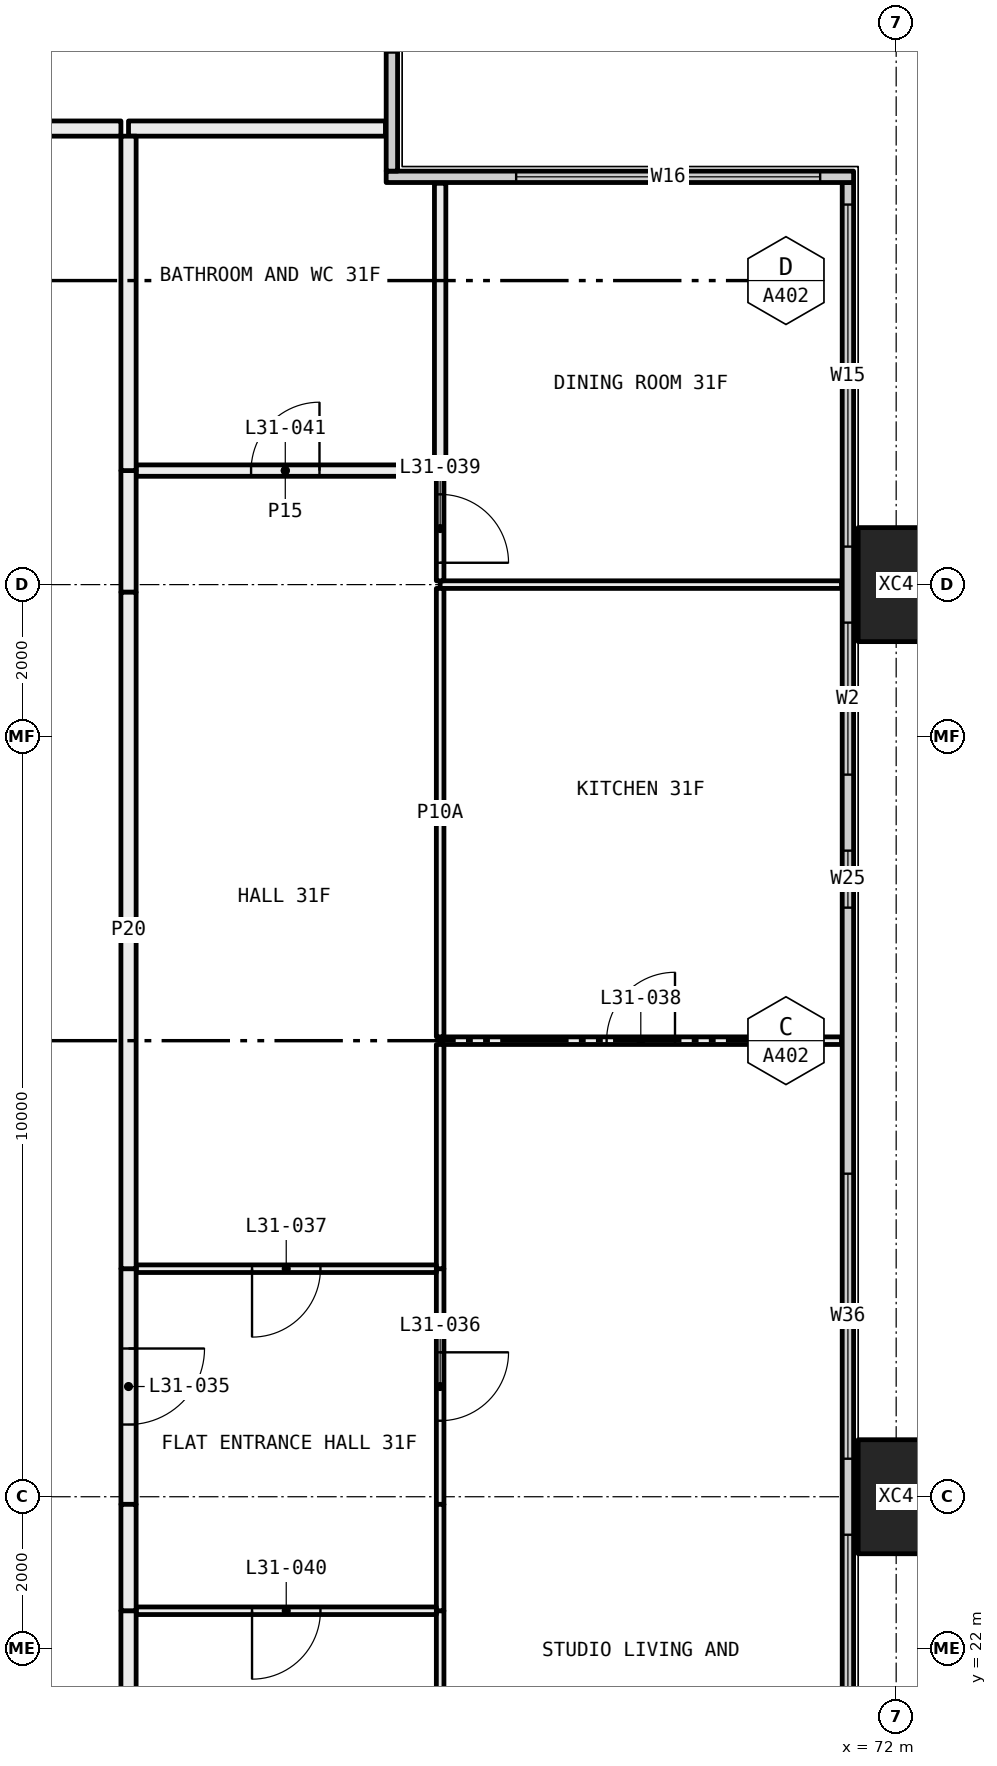
"""IFC4 building model, lengths in metres.
Left out: names, types, materials, properties, quantities, classifications, styles, units other than length and angle.
Written with IfcOpenShell. Run it as: python <this file> out.ifc"""

import sys

from ifc_helpers import new_model, si_unit, direction, frame, frame_2d, origin, origin_2d, place, context, subcontext, project, spatial, rectangle, hollow_rectangle, extrude, element, fill, save


model = new_model("IFC4")
c1 = context("Model", 3, precision=1e-05, world=origin(), true_north=direction((0.0, 1.0)))
c2 = subcontext(c1, "Body", "Model", "MODEL_VIEW")
j1 = project(units=[si_unit("LENGTHUNIT", "METRE"), si_unit("PLANEANGLEUNIT", "RADIAN")], contexts=[c1])
p1 = place(None, origin())
s1 = spatial("IfcSite", under=j1, at=p1, CompositionType="ELEMENT")
p2 = place(p1, origin())
s2 = spatial("IfcBuilding", under=s1, at=p2, CompositionType="ELEMENT")
p3 = place(p2, frame((0.0, 0.0, 120.75)))
s3 = spatial("IfcBuildingStorey", under=s2, at=p3, CompositionType="ELEMENT", Elevation=120.75)
for number, where, z_axis, x_axis in (
    (1, (72.0, 24.0, -0.4), (0.0, 0.0, 1.0), (0.0, 1.0, 0.0)),
    (2, (72.0, 36.0, -0.4), (0.0, 0.0, 1.0), (0.0, 1.0, 0.0)),
):
    element("IfcColumn", number, at=place(p3, frame(where, z_axis=z_axis, x_axis=x_axis)), inside=s3, PredefinedType="COLUMN", context=c2, shape_type="SweptSolid", body=[
        extrude(hollow_rectangle(XDim=1.5, YDim=1.0, WallThickness=0.06, at=origin_2d()), origin(), (0.0, 0.0, 1.0), 3.45),
    ])
p4 = place(p3, frame((71.365, 18.71, 0.0), z_axis=(0.0, 0.0, 1.0), x_axis=(0.0, 1.0, 0.0)))
e3 = element("IfcWall", 3, at=p4, inside=s3, PredefinedType="ELEMENTEDWALL", context=c2, shape_type="SweptSolid", body=[
    extrude(rectangle(XDim=22.58, YDim=0.15, at=frame_2d((11.29, 0.0))), origin(), (0.0, 0.0, 1.0), 3.05),
])
p5 = place(p4, frame((0.29, 0.0, 0.45)))
e4 = element("IfcOpeningElement", 4, at=p5, cuts=e3, PredefinedType="OPENING", context=c2, shape_type="SweptSolid", body=[
    extrude(rectangle(XDim=4.5, YDim=2.55, at=frame_2d((2.25, 1.275))), frame((0.0, 0.085, 0.0), z_axis=(0.0, -1.0, 0.0), x_axis=(1.0, 0.0, 0.0)), (0.0, 0.0, 1.0), 0.17),
])
p6 = place(p4, frame((5.79, 0.0, 0.45)))
e5 = element("IfcOpeningElement", 5, at=p6, cuts=e3, PredefinedType="OPENING", context=c2, shape_type="SweptSolid", body=[
    extrude(rectangle(XDim=3.75, YDim=2.55, at=frame_2d((1.875, 1.275))), frame((0.0, 0.085, 0.0), z_axis=(0.0, -1.0, 0.0), x_axis=(1.0, 0.0, 0.0)), (0.0, 0.0, 1.0), 0.17),
])
p7 = place(p4, frame((13.04, 0.0, 0.45)))
e6 = element("IfcOpeningElement", 6, at=p7, cuts=e3, PredefinedType="OPENING", context=c2, shape_type="SweptSolid", body=[
    extrude(rectangle(XDim=0.75, YDim=2.55, at=frame_2d((0.375, 1.275))), frame((0.0, 0.085, 0.0), z_axis=(0.0, -1.0, 0.0), x_axis=(1.0, 0.0, 0.0)), (0.0, 0.0, 1.0), 0.17),
])
p8 = place(p4, frame((14.79, 0.0, 0.45)))
e7 = element("IfcOpeningElement", 7, at=p8, cuts=e3, PredefinedType="OPENING", context=c2, shape_type="SweptSolid", body=[
    extrude(rectangle(XDim=2.0, YDim=2.55, at=frame_2d((1.0, 1.275))), frame((0.0, 0.085, 0.0), z_axis=(0.0, -1.0, 0.0), x_axis=(1.0, 0.0, 0.0)), (0.0, 0.0, 1.0), 0.17),
])
p9 = place(p4, frame((17.79, 0.0, 0.45)))
e8 = element("IfcOpeningElement", 8, at=p9, cuts=e3, PredefinedType="OPENING", context=c2, shape_type="SweptSolid", body=[
    extrude(rectangle(XDim=4.5, YDim=2.55, at=frame_2d((2.25, 1.275))), frame((0.0, 0.085, 0.0), z_axis=(0.0, -1.0, 0.0), x_axis=(1.0, 0.0, 0.0)), (0.0, 0.0, 1.0), 0.17),
])
p10 = place(p3, frame((65.29, 41.365, 0.0), z_axis=(0.0, 0.0, 1.0), x_axis=(1.0, 0.0, 0.0)))
e9 = element("IfcWall", 9, at=p10, inside=s3, PredefinedType="ELEMENTEDWALL", context=c2, shape_type="SweptSolid", body=[
    extrude(rectangle(XDim=6.15, YDim=0.15, at=frame_2d((3.075, 0.0))), origin(), (0.0, 0.0, 1.0), 3.05),
])
p11 = place(p10, frame((1.71, 0.0, 0.45)))
e10 = element("IfcOpeningElement", 10, at=p11, cuts=e9, PredefinedType="OPENING", context=c2, shape_type="SweptSolid", body=[
    extrude(rectangle(XDim=4.0, YDim=2.55, at=frame_2d((2.0, 1.275))), frame((0.0, 0.085, 0.0), z_axis=(0.0, -1.0, 0.0), x_axis=(1.0, 0.0, 0.0)), (0.0, 0.0, 1.0), 0.17),
])
p12 = place(p3, frame((65.365, 41.44, 0.0), z_axis=(0.0, 0.0, 1.0), x_axis=(0.0, 1.0, 0.0)))
e11 = element("IfcWall", 11, at=p12, inside=s3, PredefinedType="ELEMENTEDWALL", context=c2, shape_type="SweptSolid", body=[
    extrude(rectangle(XDim=5.85, YDim=0.15, at=frame_2d((2.925, 0.0))), origin(), (0.0, 0.0, 1.0), 3.05),
])
p13 = place(p12, frame((1.56, 0.0, 0.45)))
e12 = element("IfcOpeningElement", 12, at=p13, cuts=e11, PredefinedType="OPENING", context=c2, shape_type="SweptSolid", body=[
    extrude(rectangle(XDim=4.0, YDim=2.55, at=frame_2d((2.0, 1.275))), frame((0.0, 0.085, 0.0), z_axis=(0.0, -1.0, 0.0), x_axis=(1.0, 0.0, 0.0)), (0.0, 0.0, 1.0), 0.17),
])
p14 = place(p3, frame((71.28, 30.0, 0.0), z_axis=(0.0, 0.0, 1.0), x_axis=(-1.0, 0.0, 0.0)))
e13 = element("IfcWall", 13, at=p14, inside=s3, PredefinedType="PARTITIONING", context=c2, shape_type="SweptSolid", body=[
    extrude(rectangle(XDim=5.28, YDim=0.1, at=frame_2d((2.64, 0.0))), origin(), (0.0, 0.0, 1.0), 3.05),
])
p15 = place(p14, frame((2.19, 0.0, 0.0)))
e14 = element("IfcOpeningElement", 14, at=p15, cuts=e13, PredefinedType="OPENING", context=c2, shape_type="SweptSolid", body=[
    extrude(rectangle(XDim=0.9, YDim=2.1, at=frame_2d((0.45, 1.05))), frame((0.0, 0.06, 0.0), z_axis=(0.0, -1.0, 0.0), x_axis=(1.0, 0.0, 0.0)), (0.0, 0.0, 1.0), 0.12),
])
p16 = place(p3, frame((66.0, 22.5, 0.0), z_axis=(0.0, 0.0, 1.0), x_axis=(0.0, -1.0, 0.0)))
e15 = element("IfcWall", 15, at=p16, inside=s3, PredefinedType="PARTITIONING", context=c2, shape_type="SweptSolid", body=[
    extrude(rectangle(XDim=3.78, YDim=0.1, at=frame_2d((1.89, 0.0))), origin(), (0.0, 0.0, 1.0), 3.05),
])
p17 = place(p3, frame((66.0, 27.0, 0.0), z_axis=(0.0, 0.0, 1.0), x_axis=(0.0, -1.0, 0.0)))
e16 = element("IfcWall", 16, at=p17, inside=s3, PredefinedType="PARTITIONING", context=c2, shape_type="SweptSolid", body=[
    extrude(rectangle(XDim=3.1, YDim=0.1, at=frame_2d((1.55, 0.0))), origin(), (0.0, 0.0, 1.0), 2.45),
])
p18 = place(p17, frame((1.1, 0.0, 0.0)))
e17 = element("IfcOpeningElement", 17, at=p18, cuts=e16, PredefinedType="OPENING", context=c2, shape_type="SweptSolid", body=[
    extrude(rectangle(XDim=0.9, YDim=2.1, at=frame_2d((0.45, 1.05))), frame((0.0, 0.06, 0.0), z_axis=(0.0, -1.0, 0.0), x_axis=(1.0, 0.0, 0.0)), (0.0, 0.0, 1.0), 0.12),
])
p19 = place(p3, frame((66.0, 23.9, 0.0), z_axis=(0.0, 0.0, 1.0), x_axis=(0.0, -1.0, 0.0)))
e18 = element("IfcWall", 18, at=p19, inside=s3, PredefinedType="PARTITIONING", context=c2, shape_type="SweptSolid", body=[
    extrude(rectangle(XDim=1.4, YDim=0.1, at=frame_2d((0.7, 0.0))), origin(), (0.0, 0.0, 1.0), 3.05),
])
p20 = place(p3, frame((66.0, 29.95, 0.0), z_axis=(0.0, 0.0, 1.0), x_axis=(0.0, -1.0, 0.0)))
e19 = element("IfcWall", 19, at=p20, inside=s3, PredefinedType="PARTITIONING", context=c2, shape_type="SweptSolid", body=[
    extrude(rectangle(XDim=2.95, YDim=0.1, at=frame_2d((1.475, 0.0))), origin(), (0.0, 0.0, 1.0), 3.05),
])
p21 = place(p3, frame((71.28, 36.0, 0.0), z_axis=(0.0, 0.0, 1.0), x_axis=(-1.0, 0.0, 0.0)))
e20 = element("IfcWall", 20, at=p21, inside=s3, PredefinedType="PARTITIONING", context=c2, shape_type="SweptSolid", body=[
    extrude(rectangle(XDim=5.28, YDim=0.1, at=frame_2d((2.64, 0.0))), origin(), (0.0, 0.0, 1.0), 2.45),
])
p22 = place(p3, frame((66.0, 35.95, 0.0), z_axis=(0.0, 0.0, 1.0), x_axis=(0.0, -1.0, 0.0)))
e21 = element("IfcWall", 21, at=p22, inside=s3, PredefinedType="PARTITIONING", context=c2, shape_type="SweptSolid", body=[
    extrude(rectangle(XDim=5.9, YDim=0.1, at=frame_2d((2.95, 0.0))), origin(), (0.0, 0.0, 1.0), 2.45),
])
p23 = place(p3, frame((66.0, 37.425, 0.0), z_axis=(0.0, 0.0, 1.0), x_axis=(0.0, -1.0, 0.0)))
e22 = element("IfcWall", 22, at=p23, inside=s3, PredefinedType="PARTITIONING", context=c2, shape_type="SweptSolid", body=[
    extrude(rectangle(XDim=1.375, YDim=0.1, at=frame_2d((0.688, 0.0))), origin(), (0.0, 0.0, 1.0), 2.45),
])
p24 = place(p23, frame((0.238, 0.0, 0.0)))
e23 = element("IfcOpeningElement", 23, at=p24, cuts=e22, PredefinedType="OPENING", context=c2, shape_type="SweptSolid", body=[
    extrude(rectangle(XDim=0.9, YDim=2.1, at=frame_2d((0.45, 1.05))), frame((0.0, 0.06, 0.0), z_axis=(0.0, -1.0, 0.0), x_axis=(1.0, 0.0, 0.0)), (0.0, 0.0, 1.0), 0.12),
])
p25 = place(p3, frame((66.0, 41.28, 0.0), z_axis=(0.0, 0.0, 1.0), x_axis=(0.0, -1.0, 0.0)))
e24 = element("IfcWall", 24, at=p25, inside=s3, PredefinedType="PARTITIONING", context=c2, shape_type="SweptSolid", body=[
    extrude(rectangle(XDim=3.78, YDim=0.15, at=frame_2d((1.89, 0.0))), origin(), (0.0, 0.0, 1.0), 3.05),
])
p26 = place(p3, frame((65.95, 22.5, 0.0), z_axis=(0.0, 0.0, 1.0), x_axis=(-1.0, 0.0, 0.0)))
e25 = element("IfcWall", 25, at=p26, inside=s3, PredefinedType="PARTITIONING", context=c2, shape_type="SweptSolid", body=[
    extrude(rectangle(XDim=3.95, YDim=0.1, at=frame_2d((1.975, 0.0))), origin(), (0.0, 0.0, 1.0), 3.05),
])
p27 = place(p26, frame((1.525, 0.0, 0.0)))
e26 = element("IfcOpeningElement", 26, at=p27, cuts=e25, PredefinedType="OPENING", context=c2, shape_type="SweptSolid", body=[
    extrude(rectangle(XDim=0.9, YDim=2.1, at=frame_2d((0.45, 1.05))), frame((0.0, 0.06, 0.0), z_axis=(0.0, -1.0, 0.0), x_axis=(1.0, 0.0, 0.0)), (0.0, 0.0, 1.0), 0.12),
])
p28 = place(p3, frame((61.9, 22.5, 0.0), z_axis=(0.0, 0.0, 1.0), x_axis=(0.0, -1.0, 0.0)))
e27 = element("IfcWall", 27, at=p28, inside=s3, PredefinedType="PARTITIONING", context=c2, shape_type="SweptSolid", body=[
    extrude(rectangle(XDim=4.4, YDim=0.2, at=frame_2d((2.2, 0.0))), origin(), (0.0, 0.0, 1.0), 3.05),
])
p29 = place(p3, frame((65.95, 27.0, 0.0), z_axis=(0.0, 0.0, 1.0), x_axis=(-1.0, 0.0, 0.0)))
e28 = element("IfcWall", 28, at=p29, inside=s3, PredefinedType="PARTITIONING", context=c2, shape_type="SweptSolid", body=[
    extrude(rectangle(XDim=3.95, YDim=0.1, at=frame_2d((1.975, 0.0))), origin(), (0.0, 0.0, 1.0), 3.05),
])
p30 = place(p29, frame((1.525, 0.0, 0.0)))
e29 = element("IfcOpeningElement", 29, at=p30, cuts=e28, PredefinedType="OPENING", context=c2, shape_type="SweptSolid", body=[
    extrude(rectangle(XDim=0.9, YDim=2.1, at=frame_2d((0.45, 1.05))), frame((0.0, 0.06, 0.0), z_axis=(0.0, -1.0, 0.0), x_axis=(1.0, 0.0, 0.0)), (0.0, 0.0, 1.0), 0.12),
])
p31 = place(p3, frame((61.9, 27.0, 0.0), z_axis=(0.0, 0.0, 1.0), x_axis=(0.0, -1.0, 0.0)))
e30 = element("IfcWall", 30, at=p31, inside=s3, PredefinedType="PARTITIONING", context=c2, shape_type="SweptSolid", body=[
    extrude(rectangle(XDim=3.1, YDim=0.2, at=frame_2d((1.55, 0.0))), origin(), (0.0, 0.0, 1.0), 2.45),
])
p32 = place(p31, frame((1.05, 0.0, 0.0)))
e31 = element("IfcOpeningElement", 31, at=p32, cuts=e30, PredefinedType="OPENING", context=c2, shape_type="SweptSolid", body=[
    extrude(rectangle(XDim=1.0, YDim=2.1, at=frame_2d((0.5, 1.05))), frame((0.0, 0.11, 0.0), z_axis=(0.0, -1.0, 0.0), x_axis=(1.0, 0.0, 0.0)), (0.0, 0.0, 1.0), 0.22),
])
p33 = place(p3, frame((61.9, 23.9, 0.0), z_axis=(0.0, 0.0, 1.0), x_axis=(0.0, -1.0, 0.0)))
e32 = element("IfcWall", 32, at=p33, inside=s3, PredefinedType="PARTITIONING", context=c2, shape_type="SweptSolid", body=[
    extrude(rectangle(XDim=1.4, YDim=0.2, at=frame_2d((0.7, 0.0))), origin(), (0.0, 0.0, 1.0), 3.05),
])
p34 = place(p3, frame((65.925, 37.5, 0.0), z_axis=(0.0, 0.0, 1.0), x_axis=(-1.0, 0.0, 0.0)))
e33 = element("IfcWall", 33, at=p34, inside=s3, PredefinedType="PARTITIONING", context=c2, shape_type="SweptSolid", body=[
    extrude(rectangle(XDim=3.925, YDim=0.15, at=frame_2d((1.962, 0.0))), origin(), (0.0, 0.0, 1.0), 3.05),
])
p35 = place(p34, frame((1.512, 0.0, 0.0)))
e34 = element("IfcOpeningElement", 34, at=p35, cuts=e33, PredefinedType="OPENING", context=c2, shape_type="SweptSolid", body=[
    extrude(rectangle(XDim=0.9, YDim=2.1, at=frame_2d((0.45, 1.05))), frame((0.0, 0.085, 0.0), z_axis=(0.0, -1.0, 0.0), x_axis=(1.0, 0.0, 0.0)), (0.0, 0.0, 1.0), 0.17),
])
p36 = place(p3, frame((61.9, 37.5, 0.0), z_axis=(0.0, 0.0, 1.0), x_axis=(0.0, -1.0, 0.0)))
e35 = element("IfcWall", 35, at=p36, inside=s3, PredefinedType="PARTITIONING", context=c2, shape_type="SweptSolid", body=[
    extrude(rectangle(XDim=1.6, YDim=0.2, at=frame_2d((0.8, 0.0))), origin(), (0.0, 0.0, 1.0), 2.45),
])
p37 = place(p3, frame((61.9, 35.9, 0.0), z_axis=(0.0, 0.0, 1.0), x_axis=(0.0, -1.0, 0.0)))
e36 = element("IfcWall", 36, at=p37, inside=s3, PredefinedType="PARTITIONING", context=c2, shape_type="SweptSolid", body=[
    extrude(rectangle(XDim=8.9, YDim=0.2, at=frame_2d((4.45, 0.0))), origin(), (0.0, 0.0, 1.0), 3.05),
])
p38 = place(p3, frame((65.28, 42.0, 0.0), z_axis=(0.0, 0.0, 1.0), x_axis=(-1.0, 0.0, 0.0)))
e37 = element("IfcWall", 37, at=p38, inside=s3, PredefinedType="PARTITIONING", context=c2, shape_type="SweptSolid", body=[
    extrude(rectangle(XDim=3.38, YDim=0.2, at=frame_2d((1.69, 0.0))), origin(), (0.0, 0.0, 1.0), 3.05),
])
p39 = place(p3, frame((61.9, 41.9, 0.0), z_axis=(0.0, 0.0, 1.0), x_axis=(0.0, -1.0, 0.0)))
e38 = element("IfcWall", 38, at=p39, inside=s3, PredefinedType="PARTITIONING", context=c2, shape_type="SweptSolid", body=[
    extrude(rectangle(XDim=4.4, YDim=0.2, at=frame_2d((2.2, 0.0))), origin(), (0.0, 0.0, 1.0), 3.05),
])
p40 = place(p3, frame((54.0, 42.0, 0.0), z_axis=(0.0, 0.0, 1.0), x_axis=(1.0, 0.0, 0.0)))
e39 = element("IfcWall", 39, at=p40, inside=s3, PredefinedType="PARTITIONING", context=c2, shape_type="SweptSolid", body=[
    extrude(rectangle(XDim=7.8, YDim=0.2, at=frame_2d((3.9, 0.0))), origin(), (0.0, 0.0, 1.0), 3.05),
])
p41 = place(p5, origin())
e40 = element("IfcWindow", 40, at=p41, inside=s3, PartitioningType="SINGLE_PANEL", PredefinedType="WINDOW", context=c2, shape_type="SweptSolid", body=[
    extrude(rectangle(XDim=4.5, YDim=2.55, at=frame_2d((2.25, 1.275))), frame((0.0, 0.03, 0.0), z_axis=(0.0, -1.0, 0.0), x_axis=(1.0, 0.0, 0.0)), (0.0, 0.0, 1.0), 0.06),
])
fill(e4, e40)
p42 = place(p6, origin())
e41 = element("IfcWindow", 41, at=p42, inside=s3, PartitioningType="SINGLE_PANEL", PredefinedType="WINDOW", context=c2, shape_type="SweptSolid", body=[
    extrude(rectangle(XDim=3.75, YDim=2.55, at=frame_2d((1.875, 1.275))), frame((0.0, 0.03, 0.0), z_axis=(0.0, -1.0, 0.0), x_axis=(1.0, 0.0, 0.0)), (0.0, 0.0, 1.0), 0.06),
])
fill(e5, e41)
p43 = place(p7, origin())
e42 = element("IfcWindow", 42, at=p43, inside=s3, PartitioningType="SINGLE_PANEL", PredefinedType="WINDOW", context=c2, shape_type="SweptSolid", body=[
    extrude(rectangle(XDim=0.75, YDim=2.55, at=frame_2d((0.375, 1.275))), frame((0.0, 0.03, 0.0), z_axis=(0.0, -1.0, 0.0), x_axis=(1.0, 0.0, 0.0)), (0.0, 0.0, 1.0), 0.06),
])
fill(e6, e42)
p44 = place(p8, origin())
e43 = element("IfcWindow", 43, at=p44, inside=s3, PartitioningType="SINGLE_PANEL", PredefinedType="WINDOW", context=c2, shape_type="SweptSolid", body=[
    extrude(rectangle(XDim=2.0, YDim=2.55, at=frame_2d((1.0, 1.275))), frame((0.0, 0.03, 0.0), z_axis=(0.0, -1.0, 0.0), x_axis=(1.0, 0.0, 0.0)), (0.0, 0.0, 1.0), 0.06),
])
fill(e7, e43)
p45 = place(p9, origin())
e44 = element("IfcWindow", 44, at=p45, inside=s3, PartitioningType="SINGLE_PANEL", PredefinedType="WINDOW", context=c2, shape_type="SweptSolid", body=[
    extrude(rectangle(XDim=4.5, YDim=2.55, at=frame_2d((2.25, 1.275))), frame((0.0, 0.03, 0.0), z_axis=(0.0, -1.0, 0.0), x_axis=(1.0, 0.0, 0.0)), (0.0, 0.0, 1.0), 0.06),
])
fill(e8, e44)
p46 = place(p11, origin())
e45 = element("IfcWindow", 45, at=p46, inside=s3, PartitioningType="SINGLE_PANEL", PredefinedType="WINDOW", context=c2, shape_type="SweptSolid", body=[
    extrude(rectangle(XDim=4.0, YDim=2.55, at=frame_2d((2.0, 1.275))), frame((0.0, 0.03, 0.0), z_axis=(0.0, -1.0, 0.0), x_axis=(1.0, 0.0, 0.0)), (0.0, 0.0, 1.0), 0.06),
])
fill(e10, e45)
p47 = place(p32, origin())
e46 = element("IfcDoor", 46, at=p47, inside=s3, OperationType="SINGLE_SWING_RIGHT", PredefinedType="DOOR", context=c2, shape_type="SweptSolid", body=[
    extrude(rectangle(XDim=1.0, YDim=2.1, at=frame_2d((0.5, 1.05))), frame((0.0, 0.025, 0.0), z_axis=(0.0, -1.0, 0.0), x_axis=(1.0, 0.0, 0.0)), (0.0, 0.0, 1.0), 0.05),
])
fill(e31, e46)
p48 = place(p18, origin())
e47 = element("IfcDoor", 47, at=p48, inside=s3, OperationType="SINGLE_SWING_RIGHT", PredefinedType="DOOR", context=c2, shape_type="SweptSolid", body=[
    extrude(rectangle(XDim=0.9, YDim=2.1, at=frame_2d((0.45, 1.05))), frame((0.0, 0.025, 0.0), z_axis=(0.0, -1.0, 0.0), x_axis=(1.0, 0.0, 0.0)), (0.0, 0.0, 1.0), 0.05),
])
fill(e17, e47)
p49 = place(p30, origin())
e48 = element("IfcDoor", 48, at=p49, inside=s3, OperationType="SINGLE_SWING_LEFT", PredefinedType="DOOR", context=c2, shape_type="SweptSolid", body=[
    extrude(rectangle(XDim=0.9, YDim=2.1, at=frame_2d((0.45, 1.05))), frame((0.0, 0.025, 0.0), z_axis=(0.0, -1.0, 0.0), x_axis=(1.0, 0.0, 0.0)), (0.0, 0.0, 1.0), 0.05),
])
fill(e29, e48)
p50 = place(p15, frame((0.9, 0.0, 0.0), x_axis=(-1.0, 0.0, 0.0)))
e49 = element("IfcDoor", 49, at=p50, inside=s3, OperationType="SINGLE_SWING_LEFT", PredefinedType="DOOR", context=c2, shape_type="SweptSolid", body=[
    extrude(rectangle(XDim=0.9, YDim=2.1, at=frame_2d((0.45, 1.05))), frame((0.0, 0.025, 0.0), z_axis=(0.0, -1.0, 0.0), x_axis=(1.0, 0.0, 0.0)), (0.0, 0.0, 1.0), 0.05),
])
fill(e14, e49)
p51 = place(p24, origin())
e50 = element("IfcDoor", 50, at=p51, inside=s3, OperationType="SINGLE_SWING_LEFT", PredefinedType="DOOR", context=c2, shape_type="SweptSolid", body=[
    extrude(rectangle(XDim=0.9, YDim=2.1, at=frame_2d((0.45, 1.05))), frame((0.0, 0.025, 0.0), z_axis=(0.0, -1.0, 0.0), x_axis=(1.0, 0.0, 0.0)), (0.0, 0.0, 1.0), 0.05),
])
fill(e23, e50)
p52 = place(p27, origin())
e51 = element("IfcDoor", 51, at=p52, inside=s3, OperationType="SINGLE_SWING_LEFT", PredefinedType="DOOR", context=c2, shape_type="SweptSolid", body=[
    extrude(rectangle(XDim=0.9, YDim=2.1, at=frame_2d((0.45, 1.05))), frame((0.0, 0.025, 0.0), z_axis=(0.0, -1.0, 0.0), x_axis=(1.0, 0.0, 0.0)), (0.0, 0.0, 1.0), 0.05),
])
fill(e26, e51)
p53 = place(p35, frame((0.9, 0.0, 0.0), x_axis=(-1.0, 0.0, 0.0)))
e52 = element("IfcDoor", 52, at=p53, inside=s3, OperationType="SINGLE_SWING_LEFT", PredefinedType="DOOR", context=c2, shape_type="SweptSolid", body=[
    extrude(rectangle(XDim=0.9, YDim=2.1, at=frame_2d((0.45, 1.05))), frame((0.0, 0.025, 0.0), z_axis=(0.0, -1.0, 0.0), x_axis=(1.0, 0.0, 0.0)), (0.0, 0.0, 1.0), 0.05),
])
fill(e34, e52)
save(model, sys.argv[1])
